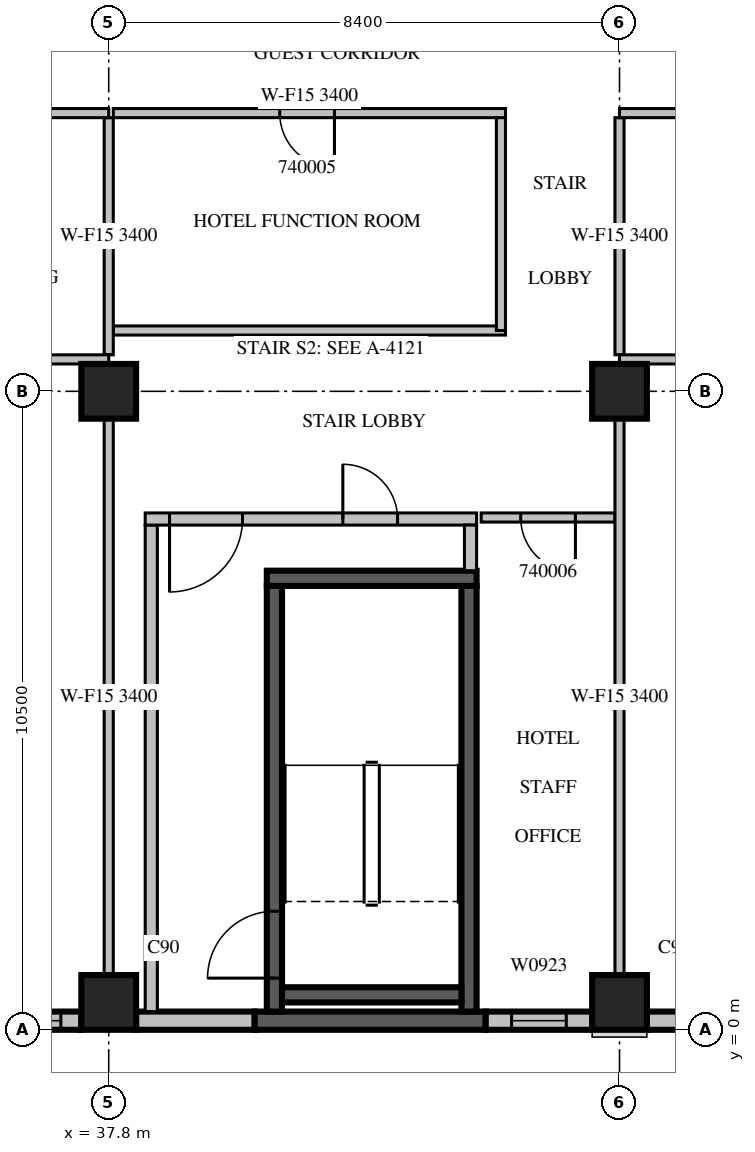
"""IFC4 building model, lengths in metres.
Left out: names, types, materials, properties, quantities, classifications, styles, units other than length and angle.
Written with IfcOpenShell. Run it as: python <this file> out.ifc"""

import sys

from ifc_helpers import new_model, si_unit, direction, frame, frame_2d, origin, origin_2d, place, context, subcontext, project, spatial, rectangle, extrude, source, transform, mapped, element, fill, save


model = new_model("IFC4")
c1 = context("Model", 3, precision=1e-05, world=origin(), true_north=direction((0.0, 1.0)))
c2 = subcontext(c1, "Body", "Model", "MODEL_VIEW")
j1 = project(units=[si_unit("LENGTHUNIT", "METRE"), si_unit("PLANEANGLEUNIT", "RADIAN")], contexts=[c1])
p1 = place(None, origin())
s1 = spatial("IfcSite", under=j1, at=p1, CompositionType="ELEMENT")
p2 = place(p1, origin())
s2 = spatial("IfcBuilding", under=s1, at=p2, CompositionType="ELEMENT")
p3 = place(p2, frame((0.0, 0.0, 185.4)))
s3 = spatial("IfcBuildingStorey", under=s2, at=p3, CompositionType="ELEMENT", Elevation=185.4)
m1 = source(origin(), c2, "Body", "SweptSolid", [
    extrude(rectangle(XDim=0.9, YDim=0.9, at=origin_2d()), origin(), (0.0, 0.0, 1.0), 3.8),
])
for number, where, z_axis, x_axis in (
    (1, (37.8, 0.45, 0.0), (0.0, 0.0, 1.0), (1.0, 0.0, 0.0)),
    (2, (46.2, 0.45, 0.0), (0.0, 0.0, 1.0), (1.0, 0.0, 0.0)),
    (3, (37.8, 10.5, 0.0), (0.0, 0.0, 1.0), (1.0, 0.0, 0.0)),
    (4, (46.2, 10.5, 0.0), (0.0, 0.0, 1.0), (1.0, 0.0, 0.0)),
):
    element("IfcColumn", number, at=place(p3, frame(where, z_axis=z_axis, x_axis=x_axis)), inside=s3, PredefinedType="COLUMN", context=c2, shape_type="MappedRepresentation", body=[
        mapped(m1, transform((0.0, 0.0, 0.0), scale=1.0)),
    ])
m2 = source(origin(), c2, "Body", "SweptSolid", [
    extrude(rectangle(XDim=7.5, YDim=0.3, at=frame_2d((3.75, 0.0))), origin(), (0.0, 0.0, 1.0), 3.4),
])
p4 = place(p3, frame((29.85, 0.15, 0.0), z_axis=(0.0, 0.0, 1.0), x_axis=(1.0, 0.0, 0.0)))
e5 = element("IfcWall", 5, at=p4, inside=s3, PredefinedType="STANDARD", context=c2, shape_type="MappedRepresentation", body=[
    mapped(m2, transform((0.0, 0.0, 0.0), scale=1.0)),
])
m3 = source(origin(), c2, "Body", "SweptSolid", [
    extrude(rectangle(XDim=1.2, YDim=2.3, at=frame_2d((0.6, 1.15))), frame((0.0, 0.16, 0.0), z_axis=(0.0, -1.0, 0.0), x_axis=(1.0, 0.0, 0.0)), (0.0, 0.0, 1.0), 0.32),
])
p5 = place(p4, frame((0.438, 0.0, 0.6)))
e6 = element("IfcOpeningElement", 6, at=p5, cuts=e5, PredefinedType="OPENING", context=c2, shape_type="MappedRepresentation", body=[
    mapped(m3, transform((0.0, 0.0, 0.0), scale=1.0)),
])
p6 = place(p4, frame((5.963, 0.0, 0.6)))
e7 = element("IfcOpeningElement", 7, at=p6, cuts=e5, PredefinedType="OPENING", context=c2, shape_type="MappedRepresentation", body=[
    mapped(m3, transform((0.0, 0.0, 0.0), scale=1.0)),
])
m4 = source(origin(), c2, "Body", "SweptSolid", [
    extrude(rectangle(XDim=2.4, YDim=2.3, at=frame_2d((1.2, 1.15))), frame((0.0, 0.16, 0.0), z_axis=(0.0, -1.0, 0.0), x_axis=(1.0, 0.0, 0.0)), (0.0, 0.0, 1.0), 0.32),
])
p7 = place(p4, frame((2.6, 0.0, 0.6)))
e8 = element("IfcOpeningElement", 8, at=p7, cuts=e5, PredefinedType="OPENING", context=c2, shape_type="MappedRepresentation", body=[
    mapped(m4, transform((0.0, 0.0, 0.0), scale=1.0)),
])
m5 = source(origin(), c2, "Body", "SweptSolid", [
    extrude(rectangle(XDim=1.95, YDim=0.3, at=frame_2d((0.975, 0.0))), origin(), (0.0, 0.0, 1.0), 3.4),
])
p8 = place(p3, frame((38.25, 0.15, 0.0), z_axis=(0.0, 0.0, 1.0), x_axis=(1.0, 0.0, 0.0)))
e9 = element("IfcWall", 9, at=p8, inside=s3, PredefinedType="STANDARD", context=c2, shape_type="MappedRepresentation", body=[
    mapped(m5, transform((0.0, 0.0, 0.0), scale=1.0)),
])
m6 = source(origin(), c2, "Body", "SweptSolid", [
    extrude(rectangle(XDim=3.8, YDim=0.3, at=frame_2d((1.9, 0.0))), origin(), (0.0, 0.0, 1.0), 3.4),
])
p9 = place(p3, frame((40.2, 0.15, 0.0), z_axis=(0.0, 0.0, 1.0), x_axis=(1.0, 0.0, 0.0)))
e10 = element("IfcWall", 10, at=p9, inside=s3, PredefinedType="SOLIDWALL", context=c2, shape_type="MappedRepresentation", body=[
    mapped(m6, transform((0.0, 0.0, 0.0), scale=1.0)),
])
m7 = source(origin(), c2, "Body", "SweptSolid", [
    extrude(rectangle(XDim=1.75, YDim=0.3, at=frame_2d((0.875, 0.0))), origin(), (0.0, 0.0, 1.0), 3.4),
])
p10 = place(p3, frame((44.0, 0.15, 0.0), z_axis=(0.0, 0.0, 1.0), x_axis=(1.0, 0.0, 0.0)))
e11 = element("IfcWall", 11, at=p10, inside=s3, PredefinedType="STANDARD", context=c2, shape_type="MappedRepresentation", body=[
    mapped(m7, transform((0.0, 0.0, 0.0), scale=1.0)),
])
m8 = source(origin(), c2, "Body", "SweptSolid", [
    extrude(rectangle(XDim=0.9, YDim=2.3, at=frame_2d((0.45, 1.15))), frame((0.0, 0.16, 0.0), z_axis=(0.0, -1.0, 0.0), x_axis=(1.0, 0.0, 0.0)), (0.0, 0.0, 1.0), 0.32),
])
p11 = place(p10, frame((0.425, 0.0, 0.6)))
e12 = element("IfcOpeningElement", 12, at=p11, cuts=e11, PredefinedType="OPENING", context=c2, shape_type="MappedRepresentation", body=[
    mapped(m8, transform((0.0, 0.0, 0.0), scale=1.0)),
])
p12 = place(p3, frame((46.65, 0.15, 0.0), z_axis=(0.0, 0.0, 1.0), x_axis=(1.0, 0.0, 0.0)))
e13 = element("IfcWall", 13, at=p12, inside=s3, PredefinedType="STANDARD", context=c2, shape_type="SweptSolid", body=[
    extrude(rectangle(XDim=4.98, YDim=0.3, at=frame_2d((2.49, 0.0))), origin(), (0.0, 0.0, 1.0), 2.9),
])
m9 = source(origin(), c2, "Body", "SweptSolid", [
    extrude(rectangle(XDim=3.6, YDim=2.3, at=frame_2d((1.8, 1.15))), frame((0.0, 0.16, 0.0), z_axis=(0.0, -1.0, 0.0), x_axis=(1.0, 0.0, 0.0)), (0.0, 0.0, 1.0), 0.32),
])
p13 = place(p12, frame((0.69, 0.0, 0.6)))
e14 = element("IfcOpeningElement", 14, at=p13, cuts=e13, PredefinedType="OPENING", context=c2, shape_type="MappedRepresentation", body=[
    mapped(m9, transform((0.0, 0.0, 0.0), scale=1.0)),
])
m10 = source(origin(), c2, "Body", "SweptSolid", [
    extrude(rectangle(XDim=7.0, YDim=0.25, at=frame_2d((3.5, 0.0))), origin(), (0.0, 0.0, 1.0), 3.4),
])
p14 = place(p3, frame((40.525, 0.3, 0.0), z_axis=(0.0, 0.0, 1.0), x_axis=(0.0, 1.0, 0.0)))
e15 = element("IfcWall", 15, at=p14, inside=s3, PredefinedType="SOLIDWALL", context=c2, shape_type="MappedRepresentation", body=[
    mapped(m10, transform((0.0, 0.0, 0.0), scale=1.0)),
])
m11 = source(origin(), c2, "Body", "SweptSolid", [
    extrude(rectangle(XDim=1.1, YDim=2.1, at=frame_2d((0.55, 1.05))), frame((0.0, 0.135, 0.0), z_axis=(0.0, -1.0, 0.0), x_axis=(1.0, 0.0, 0.0)), (0.0, 0.0, 1.0), 0.27),
])
p15 = place(p14, frame((0.55, 0.0, 0.0)))
e16 = element("IfcOpeningElement", 16, at=p15, cuts=e15, PredefinedType="OPENING", context=c2, shape_type="MappedRepresentation", body=[
    mapped(m11, transform((0.0, 0.0, 0.0), scale=1.0)),
])
p16 = place(p3, frame((43.725, 0.3, 0.0), z_axis=(0.0, 0.0, 1.0), x_axis=(0.0, 1.0, 0.0)))
e17 = element("IfcWall", 17, at=p16, inside=s3, PredefinedType="SOLIDWALL", context=c2, shape_type="MappedRepresentation", body=[
    mapped(m10, transform((0.0, 0.0, 0.0), scale=1.0)),
])
m12 = source(origin(), c2, "Body", "SweptSolid", [
    extrude(rectangle(XDim=3.45, YDim=0.25, at=frame_2d((1.725, 0.0))), origin(), (0.0, 0.0, 1.0), 3.4),
])
p17 = place(p3, frame((40.4, 7.425, 0.0), z_axis=(0.0, 0.0, 1.0), x_axis=(1.0, 0.0, 0.0)))
e18 = element("IfcWall", 18, at=p17, inside=s3, PredefinedType="SOLIDWALL", context=c2, shape_type="MappedRepresentation", body=[
    mapped(m12, transform((0.0, 0.0, 0.0), scale=1.0)),
])
m13 = source(origin(), c2, "Body", "SweptSolid", [
    extrude(rectangle(XDim=2.95, YDim=0.25, at=frame_2d((1.475, 0.0))), origin(), (0.0, 0.0, 1.0), 3.4),
])
p18 = place(p3, frame((40.65, 0.575, 0.0), z_axis=(0.0, 0.0, 1.0), x_axis=(1.0, 0.0, 0.0)))
e19 = element("IfcWall", 19, at=p18, inside=s3, PredefinedType="SOLIDWALL", context=c2, shape_type="MappedRepresentation", body=[
    mapped(m13, transform((0.0, 0.0, 0.0), scale=1.0)),
])
m14 = source(origin(), c2, "Body", "SweptSolid", [
    extrude(rectangle(XDim=8.0, YDim=0.2, at=frame_2d((4.0, 0.0))), origin(), (0.0, 0.0, 1.0), 3.4),
])
p19 = place(p3, frame((38.5, 0.3, 0.0), z_axis=(0.0, 0.0, 1.0), x_axis=(0.0, 1.0, 0.0)))
e20 = element("IfcWall", 20, at=p19, inside=s3, PredefinedType="PARTITIONING", context=c2, shape_type="MappedRepresentation", body=[
    mapped(m14, transform((0.0, 0.0, 0.0), scale=1.0)),
])
m15 = source(origin(), c2, "Body", "SweptSolid", [
    extrude(rectangle(XDim=5.45, YDim=0.2, at=frame_2d((2.725, 0.0))), origin(), (0.0, 0.0, 1.0), 3.4),
])
p20 = place(p3, frame((38.4, 8.4, 0.0), z_axis=(0.0, 0.0, 1.0), x_axis=(1.0, 0.0, 0.0)))
e21 = element("IfcWall", 21, at=p20, inside=s3, PredefinedType="PARTITIONING", context=c2, shape_type="MappedRepresentation", body=[
    mapped(m15, transform((0.0, 0.0, 0.0), scale=1.0)),
])
m16 = source(origin(), c2, "Body", "SweptSolid", [
    extrude(rectangle(XDim=1.2, YDim=2.1, at=frame_2d((0.6, 1.05))), frame((0.0, 0.11, 0.0), z_axis=(0.0, -1.0, 0.0), x_axis=(1.0, 0.0, 0.0)), (0.0, 0.0, 1.0), 0.22),
])
p21 = place(p20, frame((0.4, 0.0, 0.0)))
e22 = element("IfcOpeningElement", 22, at=p21, cuts=e21, PredefinedType="OPENING", context=c2, shape_type="MappedRepresentation", body=[
    mapped(m16, transform((0.0, 0.0, 0.0), scale=1.0)),
])
m17 = source(origin(), c2, "Body", "SweptSolid", [
    extrude(rectangle(XDim=0.9, YDim=2.1, at=frame_2d((0.45, 1.05))), frame((0.0, 0.11, 0.0), z_axis=(0.0, -1.0, 0.0), x_axis=(1.0, 0.0, 0.0)), (0.0, 0.0, 1.0), 0.22),
])
p22 = place(p20, frame((3.25, 0.0, 0.0)))
e23 = element("IfcOpeningElement", 23, at=p22, cuts=e21, PredefinedType="OPENING", context=c2, shape_type="MappedRepresentation", body=[
    mapped(m17, transform((0.0, 0.0, 0.0), scale=1.0)),
])
m18 = source(origin(), c2, "Body", "SweptSolid", [
    extrude(rectangle(XDim=0.75, YDim=0.2, at=frame_2d((0.375, 0.0))), origin(), (0.0, 0.0, 1.0), 3.4),
])
p23 = place(p3, frame((43.75, 7.55, 0.0), z_axis=(0.0, 0.0, 1.0), x_axis=(0.0, 1.0, 0.0)))
e24 = element("IfcWall", 24, at=p23, inside=s3, PredefinedType="PARTITIONING", context=c2, shape_type="MappedRepresentation", body=[
    mapped(m18, transform((0.0, 0.0, 0.0), scale=1.0)),
])
m19 = source(origin(), c2, "Body", "SweptSolid", [
    extrude(rectangle(XDim=6.45, YDim=0.15, at=frame_2d((3.225, 0.0))), origin(), (0.0, 0.0, 1.0), 3.4),
])
p24 = place(p3, frame((37.875, 11.5, 0.0), z_axis=(0.0, 0.0, 1.0), x_axis=(1.0, 0.0, 0.0)))
e25 = element("IfcWall", 25, at=p24, inside=s3, PredefinedType="PARTITIONING", context=c2, shape_type="MappedRepresentation", body=[
    mapped(m19, transform((0.0, 0.0, 0.0), scale=1.0)),
])
m20 = source(origin(), c2, "Body", "SweptSolid", [
    extrude(rectangle(XDim=3.575, YDim=0.15, at=frame_2d((1.788, 0.0))), origin(), (0.0, 0.0, 1.0), 3.4),
])
p25 = place(p3, frame((44.25, 11.5, 0.0), z_axis=(0.0, 0.0, 1.0), x_axis=(0.0, 1.0, 0.0)))
e26 = element("IfcWall", 26, at=p25, inside=s3, PredefinedType="PARTITIONING", context=c2, shape_type="MappedRepresentation", body=[
    mapped(m20, transform((0.0, 0.0, 0.0), scale=1.0)),
])
p26 = place(p3, frame((44.325, 15.075, 0.0), z_axis=(0.0, 0.0, 1.0), x_axis=(-1.0, 0.0, 0.0)))
e27 = element("IfcWall", 27, at=p26, inside=s3, PredefinedType="PARTITIONING", context=c2, shape_type="MappedRepresentation", body=[
    mapped(m19, transform((0.0, 0.0, 0.0), scale=1.0)),
])
m21 = source(origin(), c2, "Body", "SweptSolid", [
    extrude(rectangle(XDim=0.9, YDim=2.1, at=frame_2d((0.45, 1.05))), frame((0.0, 0.085, 0.0), z_axis=(0.0, -1.0, 0.0), x_axis=(1.0, 0.0, 0.0)), (0.0, 0.0, 1.0), 0.17),
])
p27 = place(p26, frame((2.812, 0.0, 0.0)))
e28 = element("IfcOpeningElement", 28, at=p27, cuts=e27, PredefinedType="OPENING", context=c2, shape_type="MappedRepresentation", body=[
    mapped(m21, transform((0.0, 0.0, 0.0), scale=1.0)),
])
m22 = source(origin(), c2, "Body", "SweptSolid", [
    extrude(rectangle(XDim=2.2, YDim=0.15, at=frame_2d((1.1, 0.0))), origin(), (0.0, 0.0, 1.0), 3.4),
])
p28 = place(p3, frame((46.125, 8.425, 0.0), z_axis=(0.0, 0.0, 1.0), x_axis=(-1.0, 0.0, 0.0)))
e29 = element("IfcWall", 29, at=p28, inside=s3, PredefinedType="PARTITIONING", context=c2, shape_type="MappedRepresentation", body=[
    mapped(m22, transform((0.0, 0.0, 0.0), scale=1.0)),
])
p29 = place(p28, frame((0.65, 0.0, 0.0)))
e30 = element("IfcOpeningElement", 30, at=p29, cuts=e29, PredefinedType="OPENING", context=c2, shape_type="MappedRepresentation", body=[
    mapped(m21, transform((0.0, 0.0, 0.0), scale=1.0)),
])
m23 = source(origin(), c2, "Body", "SweptSolid", [
    extrude(rectangle(XDim=9.152, YDim=0.15, at=frame_2d((4.576, 0.0))), origin(), (0.0, 0.0, 1.0), 3.4),
])
p30 = place(p3, frame((37.8, 0.899, 0.0), z_axis=(0.0, 0.0, 1.0), x_axis=(0.0, 1.0, 0.0)))
e31 = element("IfcWall", 31, at=p30, inside=s3, PredefinedType="PARTITIONING", context=c2, shape_type="MappedRepresentation", body=[
    mapped(m23, transform((0.0, 0.0, 0.0), scale=1.0)),
])
m24 = source(origin(), c2, "Body", "SweptSolid", [
    extrude(rectangle(XDim=3.9, YDim=0.15, at=frame_2d((1.95, 0.0))), origin(), (0.0, 0.0, 1.0), 3.4),
])
p31 = place(p3, frame((37.8, 11.1, 0.0), z_axis=(0.0, 0.0, 1.0), x_axis=(0.0, 1.0, 0.0)))
e32 = element("IfcWall", 32, at=p31, inside=s3, PredefinedType="PARTITIONING", context=c2, shape_type="MappedRepresentation", body=[
    mapped(m24, transform((0.0, 0.0, 0.0), scale=1.0)),
])
m25 = source(origin(), c2, "Body", "SweptSolid", [
    extrude(rectangle(XDim=8.4, YDim=0.15, at=frame_2d((4.2, 0.0))), origin(), (0.0, 0.0, 1.0), 3.4),
])
p32 = place(p3, frame((37.8, 11.025, 0.0), z_axis=(0.0, 0.0, 1.0), x_axis=(-1.0, 0.0, 0.0)))
e33 = element("IfcWall", 33, at=p32, inside=s3, PredefinedType="PARTITIONING", context=c2, shape_type="MappedRepresentation", body=[
    mapped(m25, transform((0.0, 0.0, 0.0), scale=1.0)),
])
m26 = source(origin(), c2, "Body", "SweptSolid", [
    extrude(rectangle(XDim=1.1, YDim=2.1, at=frame_2d((0.55, 1.05))), frame((0.0, 0.085, 0.0), z_axis=(0.0, -1.0, 0.0), x_axis=(1.0, 0.0, 0.0)), (0.0, 0.0, 1.0), 0.17),
])
p33 = place(p32, frame((6.424, 0.0, 0.0)))
e34 = element("IfcOpeningElement", 34, at=p33, cuts=e33, PredefinedType="OPENING", context=c2, shape_type="MappedRepresentation", body=[
    mapped(m26, transform((0.0, 0.0, 0.0), scale=1.0)),
])
p34 = place(p32, frame((4.12, 0.0, 0.0)))
e35 = element("IfcOpeningElement", 35, at=p34, cuts=e33, PredefinedType="OPENING", context=c2, shape_type="MappedRepresentation", body=[
    mapped(m21, transform((0.0, 0.0, 0.0), scale=1.0)),
])
p35 = place(p32, frame((1.346, 0.0, 0.0)))
e36 = element("IfcOpeningElement", 36, at=p35, cuts=e33, PredefinedType="OPENING", context=c2, shape_type="MappedRepresentation", body=[
    mapped(m21, transform((0.0, 0.0, 0.0), scale=1.0)),
])
p36 = place(p3, frame((46.2, 0.899, 0.0), z_axis=(0.0, 0.0, 1.0), x_axis=(0.0, 1.0, 0.0)))
e37 = element("IfcWall", 37, at=p36, inside=s3, PredefinedType="PARTITIONING", context=c2, shape_type="MappedRepresentation", body=[
    mapped(m23, transform((0.0, 0.0, 0.0), scale=1.0)),
])
p37 = place(p3, frame((46.2, 11.1, 0.0), z_axis=(0.0, 0.0, 1.0), x_axis=(0.0, 1.0, 0.0)))
e38 = element("IfcWall", 38, at=p37, inside=s3, PredefinedType="PARTITIONING", context=c2, shape_type="MappedRepresentation", body=[
    mapped(m24, transform((0.0, 0.0, 0.0), scale=1.0)),
])
m27 = source(origin(), c2, "Body", "SweptSolid", [
    extrude(rectangle(XDim=13.14, YDim=0.15, at=frame_2d((6.57, 0.0))), origin(), (0.0, 0.0, 1.0), 3.4),
])
p38 = place(p3, frame((59.34, 11.025, 0.0), z_axis=(0.0, 0.0, 1.0), x_axis=(-1.0, 0.0, 0.0)))
e39 = element("IfcWall", 39, at=p38, inside=s3, PredefinedType="PARTITIONING", context=c2, shape_type="MappedRepresentation", body=[
    mapped(m27, transform((0.0, 0.0, 0.0), scale=1.0)),
])
m28 = source(origin(), c2, "Body", "SweptSolid", [
    extrude(rectangle(XDim=1.0, YDim=2.1, at=frame_2d((0.5, 1.05))), frame((0.0, 0.085, 0.0), z_axis=(0.0, -1.0, 0.0), x_axis=(1.0, 0.0, 0.0)), (0.0, 0.0, 1.0), 0.17),
])
p39 = place(p38, frame((9.703, 0.0, 0.0)))
e40 = element("IfcOpeningElement", 40, at=p39, cuts=e39, PredefinedType="OPENING", context=c2, shape_type="MappedRepresentation", body=[
    mapped(m28, transform((0.0, 0.0, 0.0), scale=1.0)),
])
p40 = place(p38, frame((8.602, 0.0, 0.0)))
e41 = element("IfcOpeningElement", 41, at=p40, cuts=e39, PredefinedType="OPENING", context=c2, shape_type="MappedRepresentation", body=[
    mapped(m28, transform((0.0, 0.0, 0.0), scale=1.0)),
])
p41 = place(p38, frame((5.061, 0.0, 0.0)))
e42 = element("IfcOpeningElement", 42, at=p41, cuts=e39, PredefinedType="OPENING", context=c2, shape_type="MappedRepresentation", body=[
    mapped(m21, transform((0.0, 0.0, 0.0), scale=1.0)),
])
p42 = place(p38, frame((2.546, 0.0, 0.0)))
e43 = element("IfcOpeningElement", 43, at=p42, cuts=e39, PredefinedType="OPENING", context=c2, shape_type="MappedRepresentation", body=[
    mapped(m21, transform((0.0, 0.0, 0.0), scale=1.0)),
])
p43 = place(p3, frame((37.8, 15.075, 0.0), z_axis=(0.0, 0.0, 1.0), x_axis=(-1.0, 0.0, 0.0)))
e44 = element("IfcWall", 44, at=p43, inside=s3, PredefinedType="PARTITIONING", context=c2, shape_type="MappedRepresentation", body=[
    mapped(m25, transform((0.0, 0.0, 0.0), scale=1.0)),
])
p44 = place(p43, frame((6.662, 0.0, 0.0)))
e45 = element("IfcOpeningElement", 45, at=p44, cuts=e44, PredefinedType="OPENING", context=c2, shape_type="MappedRepresentation", body=[
    mapped(m26, transform((0.0, 0.0, 0.0), scale=1.0)),
])
p45 = place(p3, frame((59.34, 15.075, 0.0), z_axis=(0.0, 0.0, 1.0), x_axis=(-1.0, 0.0, 0.0)))
e46 = element("IfcWall", 46, at=p45, inside=s3, PredefinedType="PARTITIONING", context=c2, shape_type="MappedRepresentation", body=[
    mapped(m27, transform((0.0, 0.0, 0.0), scale=1.0)),
])
m29 = source(origin(), c2, "Body", "SweptSolid", [
    extrude(rectangle(XDim=1.2, YDim=2.1, at=frame_2d((0.6, 1.05))), frame((0.0, 0.085, 0.0), z_axis=(0.0, -1.0, 0.0), x_axis=(1.0, 0.0, 0.0)), (0.0, 0.0, 1.0), 0.17),
])
p46 = place(p45, frame((9.6, 0.0, 0.0)))
e47 = element("IfcOpeningElement", 47, at=p46, cuts=e46, PredefinedType="OPENING", context=c2, shape_type="MappedRepresentation", body=[
    mapped(m29, transform((0.0, 0.0, 0.0), scale=1.0)),
])
m30 = source(origin(), c2, "Body", "SweptSolid", [
    extrude(rectangle(XDim=1.2, YDim=2.3, at=frame_2d((0.6, 1.15))), frame((0.0, 0.03, 0.0), z_axis=(0.0, -1.0, 0.0), x_axis=(1.0, 0.0, 0.0)), (0.0, 0.0, 1.0), 0.06),
])
p47 = place(p6, origin())
e48 = element("IfcWindow", 48, at=p47, inside=s3, PartitioningType="SINGLE_PANEL", PredefinedType="WINDOW", context=c2, shape_type="MappedRepresentation", body=[
    mapped(m30, transform((0.0, 0.0, 0.0), scale=1.0)),
])
fill(e7, e48)
m31 = source(origin(), c2, "Body", "SweptSolid", [
    extrude(rectangle(XDim=0.9, YDim=2.3, at=frame_2d((0.45, 1.15))), frame((0.0, 0.03, 0.0), z_axis=(0.0, -1.0, 0.0), x_axis=(1.0, 0.0, 0.0)), (0.0, 0.0, 1.0), 0.06),
])
p48 = place(p11, origin())
e49 = element("IfcWindow", 49, at=p48, inside=s3, PartitioningType="SINGLE_PANEL", PredefinedType="WINDOW", context=c2, shape_type="MappedRepresentation", body=[
    mapped(m31, transform((0.0, 0.0, 0.0), scale=1.0)),
])
fill(e12, e49)
m32 = source(origin(), c2, "Body", "SweptSolid", [
    extrude(rectangle(XDim=1.1, YDim=2.1, at=frame_2d((0.55, 1.05))), frame((0.0, 0.025, 0.0), z_axis=(0.0, -1.0, 0.0), x_axis=(1.0, 0.0, 0.0)), (0.0, 0.0, 1.0), 0.05),
])
p49 = place(p15, origin())
e50 = element("IfcDoor", 50, at=p49, inside=s3, OperationType="SINGLE_SWING_LEFT", PredefinedType="DOOR", context=c2, shape_type="MappedRepresentation", body=[
    mapped(m32, transform((0.0, 0.0, 0.0), scale=1.0)),
])
fill(e16, e50)
m33 = source(origin(), c2, "Body", "SweptSolid", [
    extrude(rectangle(XDim=1.2, YDim=2.1, at=frame_2d((0.6, 1.05))), frame((0.0, 0.025, 0.0), z_axis=(0.0, -1.0, 0.0), x_axis=(1.0, 0.0, 0.0)), (0.0, 0.0, 1.0), 0.05),
])
p50 = place(p21, origin())
e51 = element("IfcDoor", 51, at=p50, inside=s3, OperationType="SINGLE_SWING_RIGHT", PredefinedType="DOOR", context=c2, shape_type="MappedRepresentation", body=[
    mapped(m33, transform((0.0, 0.0, 0.0), scale=1.0)),
])
fill(e22, e51)
m34 = source(origin(), c2, "Body", "SweptSolid", [
    extrude(rectangle(XDim=0.9, YDim=2.1, at=frame_2d((0.45, 1.05))), frame((0.0, 0.025, 0.0), z_axis=(0.0, -1.0, 0.0), x_axis=(1.0, 0.0, 0.0)), (0.0, 0.0, 1.0), 0.05),
])
p51 = place(p22, origin())
e52 = element("IfcDoor", 52, at=p51, inside=s3, OperationType="SINGLE_SWING_LEFT", PredefinedType="DOOR", context=c2, shape_type="MappedRepresentation", body=[
    mapped(m34, transform((0.0, 0.0, 0.0), scale=1.0)),
])
fill(e23, e52)
p52 = place(p27, origin())
e53 = element("IfcDoor", 53, at=p52, inside=s3, OperationType="SINGLE_SWING_LEFT", PredefinedType="DOOR", context=c2, shape_type="MappedRepresentation", body=[
    mapped(m34, transform((0.0, 0.0, 0.0), scale=1.0)),
])
fill(e28, e53)
p53 = place(p29, origin())
e54 = element("IfcDoor", 54, at=p53, inside=s3, OperationType="SINGLE_SWING_LEFT", PredefinedType="DOOR", context=c2, shape_type="MappedRepresentation", body=[
    mapped(m34, transform((0.0, 0.0, 0.0), scale=1.0)),
])
fill(e30, e54)
save(model, sys.argv[1])
